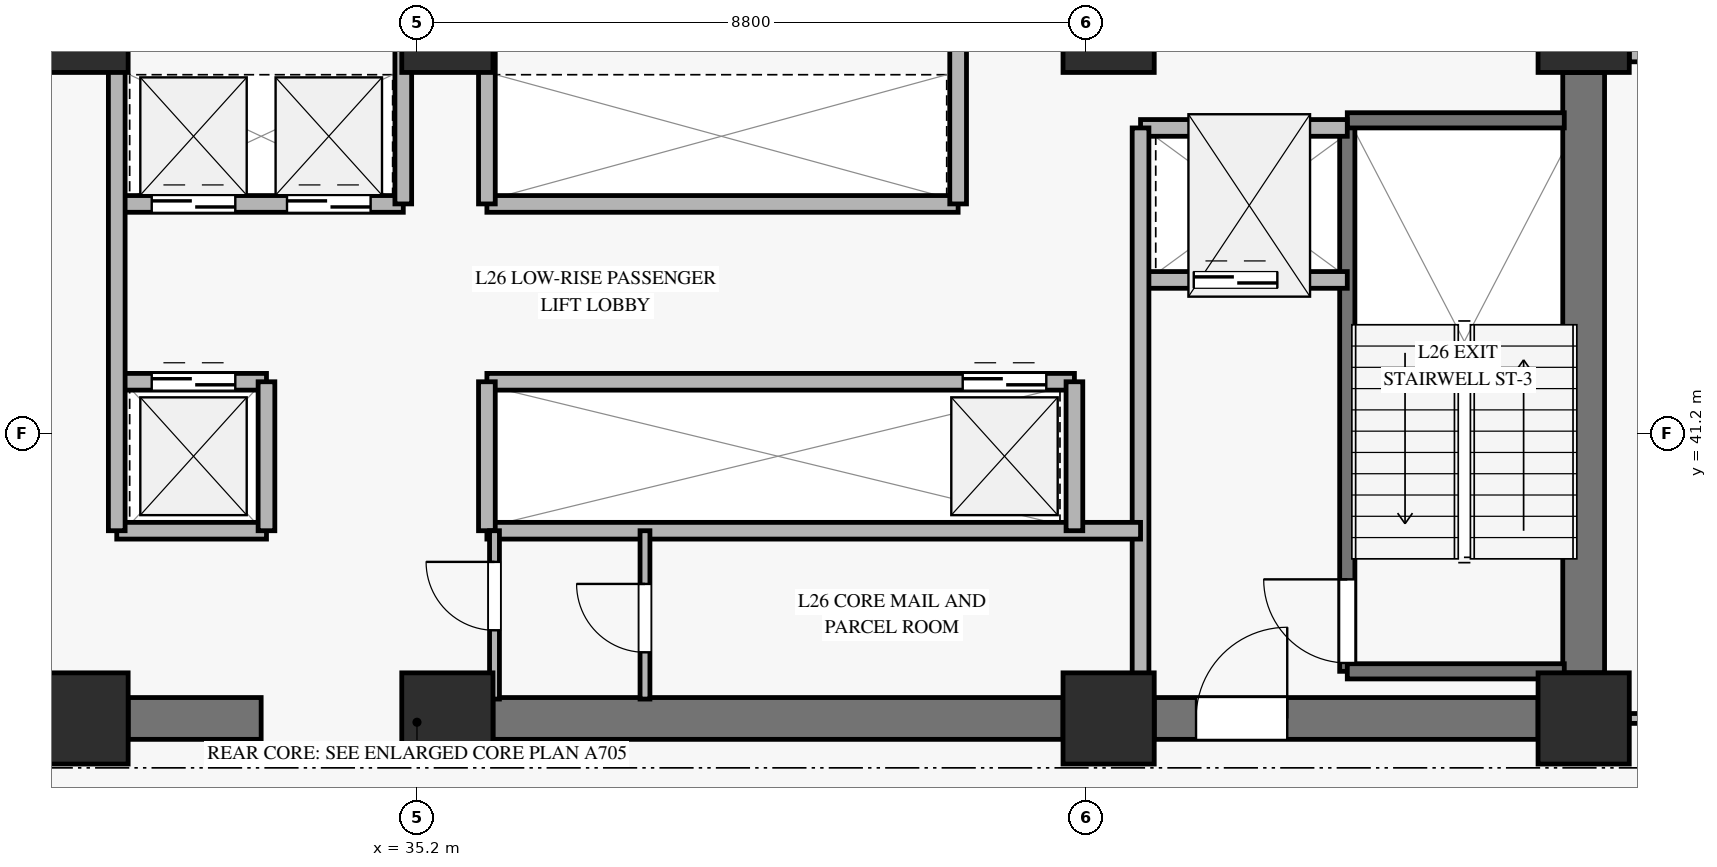
"""IFC4 building model, lengths in metres.
Left out: names, types, materials, properties, quantities, classifications, styles, units other than length and angle.
Written with IfcOpenShell. Run it as: python <this file> out.ifc"""

import sys

from ifc_helpers import new_model, si_unit, direction, frame, frame_2d, origin, origin_2d, place, context, subcontext, project, spatial, rectangle, extrude, source, transform, mapped, element, fill, save


model = new_model("IFC4")
c1 = context("Model", 3, precision=1e-05, world=origin(), true_north=direction((0.0, 1.0)))
c2 = subcontext(c1, "Body", "Model", "MODEL_VIEW")
j1 = project(units=[si_unit("LENGTHUNIT", "METRE"), si_unit("PLANEANGLEUNIT", "RADIAN")], contexts=[c1])
p1 = place(None, origin())
s1 = spatial("IfcSite", under=j1, at=p1, CompositionType="ELEMENT")
p2 = place(p1, origin())
s2 = spatial("IfcBuilding", under=s1, at=p2, CompositionType="ELEMENT")
p3 = place(p2, frame((0.0, 0.0, 107.5)))
s3 = spatial("IfcBuildingStorey", under=s2, at=p3, CompositionType="ELEMENT", Elevation=107.5)
m1 = source(origin(), c2, "Body", "SweptSolid", [
    extrude(rectangle(XDim=1.2, YDim=1.2, at=origin_2d()), origin(), (0.0, 0.0, 1.0), 3.68),
])
for number, where, z_axis, x_axis in (
    (1, (30.8, 37.45, 0.0), (0.0, 0.0, 1.0), (1.0, 0.0, 0.0)),
    (2, (30.8, 46.55, 0.0), (0.0, 0.0, 1.0), (1.0, 0.0, 0.0)),
    (3, (35.6, 37.45, 0.0), (0.0, 0.0, 1.0), (1.0, 0.0, 0.0)),
    (4, (35.6, 46.55, 0.0), (0.0, 0.0, 1.0), (1.0, 0.0, 0.0)),
    (5, (44.3, 37.45, 0.0), (0.0, 0.0, 1.0), (1.0, 0.0, 0.0)),
    (6, (44.3, 46.55, 0.0), (0.0, 0.0, 1.0), (1.0, 0.0, 0.0)),
    (7, (50.55, 37.45, 0.0), (0.0, 0.0, 1.0), (1.0, 0.0, 0.0)),
    (8, (50.55, 46.55, 0.0), (0.0, 0.0, 1.0), (1.0, 0.0, 0.0)),
):
    element("IfcColumn", number, at=place(p3, frame(where, z_axis=z_axis, x_axis=x_axis)), inside=s3, PredefinedType="PILASTER", context=c2, shape_type="MappedRepresentation", body=[
        mapped(m1, transform((0.0, 0.0, 0.0), x_axis=(1.0, 0.0, 0.0), y_axis=(0.0, 1.0, 0.0), z_axis=(0.0, 0.0, 1.0), scale=1.0)),
    ])
p4 = place(p3, frame((31.4, 37.45, 0.0), z_axis=(0.0, 0.0, 1.0), x_axis=(1.0, 0.0, 0.0)))
e9 = element("IfcWall", 9, at=p4, inside=s3, PredefinedType="SHEAR", context=c2, shape_type="SweptSolid", body=[
    extrude(rectangle(XDim=1.75, YDim=0.55, at=frame_2d((0.875, 0.0))), origin(), (0.0, 0.0, 1.0), 3.68),
])
p5 = place(p3, frame((36.2, 37.45, 0.0), z_axis=(0.0, 0.0, 1.0), x_axis=(1.0, 0.0, 0.0)))
e10 = element("IfcWall", 10, at=p5, inside=s3, PredefinedType="SHEAR", context=c2, shape_type="SweptSolid", body=[
    extrude(rectangle(XDim=7.5, YDim=0.55, at=frame_2d((3.75, 0.0))), origin(), (0.0, 0.0, 1.0), 3.68),
])
p6 = place(p3, frame((44.9, 37.45, 0.0), z_axis=(0.0, 0.0, 1.0), x_axis=(1.0, 0.0, 0.0)))
e11 = element("IfcWall", 11, at=p6, inside=s3, PredefinedType="SHEAR", context=c2, shape_type="SweptSolid", body=[
    extrude(rectangle(XDim=5.05, YDim=0.55, at=frame_2d((2.525, 0.0))), origin(), (0.0, 0.0, 1.0), 3.68),
])
p7 = place(p6, frame((0.55, 0.0, 0.0)))
e12 = element("IfcOpeningElement", 12, at=p7, cuts=e11, PredefinedType="OPENING", context=c2, shape_type="SweptSolid", body=[
    extrude(rectangle(XDim=1.2, YDim=2.15, at=frame_2d((0.6, 1.075))), frame((0.0, 0.285, 0.0), z_axis=(0.0, -1.0, 0.0), x_axis=(1.0, 0.0, 0.0)), (0.0, 0.0, 1.0), 0.57),
])
p8 = place(p3, frame((50.55, 38.05, 0.0), z_axis=(0.0, 0.0, 1.0), x_axis=(0.0, 1.0, 0.0)))
e13 = element("IfcWall", 13, at=p8, inside=s3, PredefinedType="SHEAR", context=c2, shape_type="SweptSolid", body=[
    extrude(rectangle(XDim=7.9, YDim=0.55, at=frame_2d((3.95, 0.0))), origin(), (0.0, 0.0, 1.0), 3.68),
])
p9 = place(p3, frame((51.15, 46.25, 0.0), z_axis=(0.0, 0.0, 1.0), x_axis=(1.0, 0.0, 0.0)))
e14 = element("IfcWall", 14, at=p9, inside=s3, PredefinedType="SOLIDWALL", context=c2, shape_type="SweptSolid", body=[
    extrude(rectangle(XDim=11.248, YDim=0.32, at=frame_2d((5.624, 0.0))), origin(), (0.0, 0.0, 1.0), 3.16),
])
p10 = place(p9, frame((4.824, 0.0, 0.45)))
e15 = element("IfcOpeningElement", 15, at=p10, cuts=e14, PredefinedType="OPENING", context=c2, shape_type="SweptSolid", body=[
    extrude(rectangle(XDim=1.6, YDim=2.0, at=frame_2d((0.8, 1.0))), frame((0.0, 0.17, 0.0), z_axis=(0.0, -1.0, 0.0), x_axis=(1.0, 0.0, 0.0)), (0.0, 0.0, 1.0), 0.34),
])
p11 = place(p3, frame((47.44, 38.07, 0.0), z_axis=(0.0, 0.0, 1.0), x_axis=(0.0, 1.0, 0.0)))
e16 = element("IfcWall", 16, at=p11, inside=s3, PredefinedType="SOLIDWALL", context=c2, shape_type="SweptSolid", body=[
    extrude(rectangle(XDim=7.25, YDim=0.2, at=frame_2d((3.625, 0.0))), origin(), (0.0, 0.0, 1.0), 3.9),
])
p12 = place(p11, frame((0.11, 0.0, 0.0)))
e17 = element("IfcOpeningElement", 17, at=p12, cuts=e16, PredefinedType="OPENING", context=c2, shape_type="SweptSolid", body=[
    extrude(rectangle(XDim=1.1, YDim=2.15, at=frame_2d((0.55, 1.075))), frame((0.0, 0.11, 0.0), z_axis=(0.0, -1.0, 0.0), x_axis=(1.0, 0.0, 0.0)), (0.0, 0.0, 1.0), 0.22),
])
for number, where, z_axis, x_axis in (
    (18, (47.44, 45.32, 0.0), (0.0, 0.0, 1.0), (1.0, 0.0, 0.0)),
    (19, (47.44, 38.07, 0.0), (0.0, 0.0, 1.0), (1.0, 0.0, 0.0)),
):
    element("IfcWall", number, at=place(p3, frame(where, z_axis=z_axis, x_axis=x_axis)), inside=s3, PredefinedType="SOLIDWALL", context=c2, shape_type="SweptSolid", body=[
        extrude(rectangle(XDim=2.855, YDim=0.2, at=frame_2d((1.427, 0.0))), origin(), (0.0, 0.0, 1.0), 3.9),
    ])
p13 = place(p3, frame((44.72, 43.22, 0.0), z_axis=(0.0, 0.0, 1.0), x_axis=(1.0, 0.0, 0.0)))
e20 = element("IfcWall", 20, at=p13, inside=s3, PredefinedType="SOLIDWALL", context=c2, shape_type="SweptSolid", body=[
    extrude(rectangle(XDim=2.72, YDim=0.22, at=frame_2d((1.36, 0.0))), origin(), (0.0, 0.0, 1.0), 3.68),
])
p14 = place(p13, frame((0.7, 0.0, 0.0)))
e21 = element("IfcOpeningElement", 21, at=p14, cuts=e20, PredefinedType="OPENING", context=c2, shape_type="SweptSolid", body=[
    extrude(rectangle(XDim=1.1, YDim=2.2, at=frame_2d((0.55, 1.1))), frame((0.0, 0.12, 0.0), z_axis=(0.0, -1.0, 0.0), x_axis=(1.0, 0.0, 0.0)), (0.0, 0.0, 1.0), 0.24),
])
p15 = place(p3, frame((44.72, 45.22, 0.0), z_axis=(0.0, 0.0, 1.0), x_axis=(1.0, 0.0, 0.0)))
e22 = element("IfcWall", 22, at=p15, inside=s3, PredefinedType="SOLIDWALL", context=c2, shape_type="SweptSolid", body=[
    extrude(rectangle(XDim=2.72, YDim=0.22, at=frame_2d((1.36, 0.0))), origin(), (0.0, 0.0, 1.0), 3.68),
])
p16 = place(p3, frame((44.72, 37.705, 0.0), z_axis=(0.0, 0.0, 1.0), x_axis=(0.0, 1.0, 0.0)))
e23 = element("IfcWall", 23, at=p16, inside=s3, PredefinedType="SOLIDWALL", context=c2, shape_type="SweptSolid", body=[
    extrude(rectangle(XDim=7.515, YDim=0.22, at=frame_2d((3.757, 0.0))), origin(), (0.0, 0.0, 1.0), 3.68),
])
p17 = place(p3, frame((31.25, 44.22, 0.0), z_axis=(0.0, 0.0, 1.0), x_axis=(1.0, 0.0, 0.0)))
e24 = element("IfcWall", 24, at=p17, inside=s3, PredefinedType="SOLIDWALL", context=c2, shape_type="SweptSolid", body=[
    extrude(rectangle(XDim=3.77, YDim=0.22, at=frame_2d((1.885, 0.0))), origin(), (0.0, 0.0, 1.0), 3.68),
])
p18 = place(p17, frame((0.46, 0.0, 0.0)))
e25 = element("IfcOpeningElement", 25, at=p18, cuts=e24, PredefinedType="OPENING", context=c2, shape_type="SweptSolid", body=[
    extrude(rectangle(XDim=1.1, YDim=2.2, at=frame_2d((0.55, 1.1))), frame((0.0, 0.12, 0.0), z_axis=(0.0, -1.0, 0.0), x_axis=(1.0, 0.0, 0.0)), (0.0, 0.0, 1.0), 0.24),
])
p19 = place(p17, frame((2.24, 0.0, 0.0)))
e26 = element("IfcOpeningElement", 26, at=p19, cuts=e24, PredefinedType="OPENING", context=c2, shape_type="SweptSolid", body=[
    extrude(rectangle(XDim=1.1, YDim=2.2, at=frame_2d((0.55, 1.1))), frame((0.0, 0.12, 0.0), z_axis=(0.0, -1.0, 0.0), x_axis=(1.0, 0.0, 0.0)), (0.0, 0.0, 1.0), 0.24),
])
p20 = place(p3, frame((36.12, 44.22, 0.0), z_axis=(0.0, 0.0, 1.0), x_axis=(1.0, 0.0, 0.0)))
e27 = element("IfcWall", 27, at=p20, inside=s3, PredefinedType="SOLIDWALL", context=c2, shape_type="SweptSolid", body=[
    extrude(rectangle(XDim=6.2, YDim=0.22, at=frame_2d((3.1, 0.0))), origin(), (0.0, 0.0, 1.0), 3.68),
])
for number, where, z_axis, x_axis in (
    (28, (35.02, 44.22, 0.0), (0.0, 0.0, 1.0), (0.0, 1.0, 0.0)),
    (29, (36.12, 44.22, 0.0), (0.0, 0.0, 1.0), (0.0, 1.0, 0.0)),
    (30, (42.32, 44.22, 0.0), (0.0, 0.0, 1.0), (0.0, 1.0, 0.0)),
):
    element("IfcWall", number, at=place(p3, frame(where, z_axis=z_axis, x_axis=x_axis)), inside=s3, PredefinedType="SOLIDWALL", context=c2, shape_type="SweptSolid", body=[
        extrude(rectangle(XDim=2.075, YDim=0.22, at=frame_2d((1.038, 0.0))), origin(), (0.0, 0.0, 1.0), 3.68),
    ])
p21 = place(p3, frame((31.25, 41.88, 0.0), z_axis=(0.0, 0.0, 1.0), x_axis=(1.0, 0.0, 0.0)))
e31 = element("IfcWall", 31, at=p21, inside=s3, PredefinedType="SOLIDWALL", context=c2, shape_type="SweptSolid", body=[
    extrude(rectangle(XDim=1.97, YDim=0.22, at=frame_2d((0.985, 0.0))), origin(), (0.0, 0.0, 1.0), 3.68),
])
p22 = place(p21, frame((0.46, 0.0, 0.0)))
e32 = element("IfcOpeningElement", 32, at=p22, cuts=e31, PredefinedType="OPENING", context=c2, shape_type="SweptSolid", body=[
    extrude(rectangle(XDim=1.1, YDim=2.2, at=frame_2d((0.55, 1.1))), frame((0.0, 0.12, 0.0), z_axis=(0.0, -1.0, 0.0), x_axis=(1.0, 0.0, 0.0)), (0.0, 0.0, 1.0), 0.24),
])
p23 = place(p3, frame((36.12, 41.88, 0.0), z_axis=(0.0, 0.0, 1.0), x_axis=(1.0, 0.0, 0.0)))
e33 = element("IfcWall", 33, at=p23, inside=s3, PredefinedType="SOLIDWALL", context=c2, shape_type="SweptSolid", body=[
    extrude(rectangle(XDim=7.73, YDim=0.22, at=frame_2d((3.865, 0.0))), origin(), (0.0, 0.0, 1.0), 3.68),
])
p24 = place(p23, frame((6.26, 0.0, 0.0)))
e34 = element("IfcOpeningElement", 34, at=p24, cuts=e33, PredefinedType="OPENING", context=c2, shape_type="SweptSolid", body=[
    extrude(rectangle(XDim=1.1, YDim=2.2, at=frame_2d((0.55, 1.1))), frame((0.0, 0.12, 0.0), z_axis=(0.0, -1.0, 0.0), x_axis=(1.0, 0.0, 0.0)), (0.0, 0.0, 1.0), 0.24),
])
p25 = place(p3, frame((31.25, 39.92, 0.0), z_axis=(0.0, 0.0, 1.0), x_axis=(1.0, 0.0, 0.0)))
e35 = element("IfcWall", 35, at=p25, inside=s3, PredefinedType="SOLIDWALL", context=c2, shape_type="SweptSolid", body=[
    extrude(rectangle(XDim=1.97, YDim=0.22, at=frame_2d((0.985, 0.0))), origin(), (0.0, 0.0, 1.0), 3.68),
])
p26 = place(p3, frame((33.22, 39.92, 0.0), z_axis=(0.0, 0.0, 1.0), x_axis=(0.0, 1.0, 0.0)))
e36 = element("IfcWall", 36, at=p26, inside=s3, PredefinedType="SOLIDWALL", context=c2, shape_type="SweptSolid", body=[
    extrude(rectangle(XDim=1.96, YDim=0.22, at=frame_2d((0.98, 0.0))), origin(), (0.0, 0.0, 1.0), 3.68),
])
p27 = place(p3, frame((36.12, 39.92, 0.0), z_axis=(0.0, 0.0, 1.0), x_axis=(1.0, 0.0, 0.0)))
e37 = element("IfcWall", 37, at=p27, inside=s3, PredefinedType="SOLIDWALL", context=c2, shape_type="SweptSolid", body=[
    extrude(rectangle(XDim=8.6, YDim=0.22, at=frame_2d((4.3, 0.0))), origin(), (0.0, 0.0, 1.0), 2.965),
])
p28 = place(p3, frame((36.12, 39.92, 0.0), z_axis=(0.0, 0.0, 1.0), x_axis=(0.0, 1.0, 0.0)))
e38 = element("IfcWall", 38, at=p28, inside=s3, PredefinedType="SOLIDWALL", context=c2, shape_type="SweptSolid", body=[
    extrude(rectangle(XDim=1.96, YDim=0.22, at=frame_2d((0.98, 0.0))), origin(), (0.0, 0.0, 1.0), 3.68),
])
p29 = place(p3, frame((31.25, 39.92, 0.0), z_axis=(0.0, 0.0, 1.0), x_axis=(0.0, 1.0, 0.0)))
e39 = element("IfcWall", 39, at=p29, inside=s3, PredefinedType="SOLIDWALL", context=c2, shape_type="SweptSolid", body=[
    extrude(rectangle(XDim=6.375, YDim=0.22, at=frame_2d((3.188, 0.0))), origin(), (0.0, 0.0, 1.0), 3.68),
])
p30 = place(p3, frame((43.85, 39.92, 0.0), z_axis=(0.0, 0.0, 1.0), x_axis=(0.0, 1.0, 0.0)))
e40 = element("IfcWall", 40, at=p30, inside=s3, PredefinedType="SOLIDWALL", context=c2, shape_type="SweptSolid", body=[
    extrude(rectangle(XDim=1.96, YDim=0.22, at=frame_2d((0.98, 0.0))), origin(), (0.0, 0.0, 1.0), 3.68),
])
p31 = place(p3, frame((36.22, 37.705, 0.0), z_axis=(0.0, 0.0, 1.0), x_axis=(0.0, 1.0, 0.0)))
e41 = element("IfcWall", 41, at=p31, inside=s3, PredefinedType="PARTITIONING", context=c2, shape_type="SweptSolid", body=[
    extrude(rectangle(XDim=2.215, YDim=0.13, at=frame_2d((1.107, 0.0))), origin(), (0.0, 0.0, 1.0), 3.68),
])
p32 = place(p31, frame((0.905, 0.0, 0.0)))
e42 = element("IfcOpeningElement", 42, at=p32, cuts=e41, PredefinedType="OPENING", context=c2, shape_type="SweptSolid", body=[
    extrude(rectangle(XDim=0.9, YDim=2.1, at=frame_2d((0.45, 1.05))), frame((0.0, 0.075, 0.0), z_axis=(0.0, -1.0, 0.0), x_axis=(1.0, 0.0, 0.0)), (0.0, 0.0, 1.0), 0.15),
])
p33 = place(p3, frame((38.2, 37.705, 0.0), z_axis=(0.0, 0.0, 1.0), x_axis=(0.0, 1.0, 0.0)))
e43 = element("IfcWall", 43, at=p33, inside=s3, PredefinedType="PARTITIONING", context=c2, shape_type="SweptSolid", body=[
    extrude(rectangle(XDim=2.215, YDim=0.13, at=frame_2d((1.107, 0.0))), origin(), (0.0, 0.0, 1.0), 3.68),
])
p34 = place(p33, frame((0.615, 0.0, 0.0)))
e44 = element("IfcOpeningElement", 44, at=p34, cuts=e43, PredefinedType="OPENING", context=c2, shape_type="SweptSolid", body=[
    extrude(rectangle(XDim=0.9, YDim=2.1, at=frame_2d((0.45, 1.05))), frame((0.0, 0.075, 0.0), z_axis=(0.0, -1.0, 0.0), x_axis=(1.0, 0.0, 0.0)), (0.0, 0.0, 1.0), 0.15),
])
p35 = place(p3, frame((51.15, 37.45, 0.0), z_axis=(0.0, 0.0, 1.0), x_axis=(1.0, 0.0, 0.0)))
e45 = element("IfcWall", 45, at=p35, inside=s3, PredefinedType="PARTITIONING", context=c2, shape_type="SweptSolid", body=[
    extrude(rectangle(XDim=14.741, YDim=0.13, at=frame_2d((7.371, 0.0))), origin(), (0.0, 0.0, 1.0), 3.165),
])
p36 = place(p35, frame((0.5, 0.0, 0.0)))
e46 = element("IfcOpeningElement", 46, at=p36, cuts=e45, PredefinedType="OPENING", context=c2, shape_type="SweptSolid", body=[
    extrude(rectangle(XDim=0.9, YDim=2.1, at=frame_2d((0.45, 1.05))), frame((0.0, 0.075, 0.0), z_axis=(0.0, -1.0, 0.0), x_axis=(1.0, 0.0, 0.0)), (0.0, 0.0, 1.0), 0.15),
])
p37 = place(p35, frame((10.594, 0.0, 0.0)))
e47 = element("IfcOpeningElement", 47, at=p37, cuts=e45, PredefinedType="OPENING", context=c2, shape_type="SweptSolid", body=[
    extrude(rectangle(XDim=0.95, YDim=2.1, at=frame_2d((0.475, 1.05))), frame((0.0, 0.075, 0.0), z_axis=(0.0, -1.0, 0.0), x_axis=(1.0, 0.0, 0.0)), (0.0, 0.0, 1.0), 0.15),
])
m2 = source(origin(), c2, "Body", "SweptSolid", [
    extrude(rectangle(XDim=1.1, YDim=2.15, at=frame_2d((0.55, 1.075))), frame((0.0, 0.025, 0.0), z_axis=(0.0, -1.0, 0.0), x_axis=(1.0, 0.0, 0.0)), (0.0, 0.0, 1.0), 0.05),
])
p38 = place(p12, origin())
e48 = element("IfcDoor", 48, at=p38, inside=s3, OperationType="SINGLE_SWING_RIGHT", PredefinedType="DOOR", context=c2, shape_type="MappedRepresentation", body=[
    mapped(m2, transform((0.0, 0.0, 0.0), x_axis=(1.0, 0.0, 0.0), y_axis=(0.0, 1.0, 0.0), z_axis=(0.0, 0.0, 1.0), scale=1.0)),
])
fill(e17, e48)
m3 = source(origin(), c2, "Body", "SweptSolid", [
    extrude(rectangle(XDim=1.1, YDim=2.2, at=frame_2d((0.55, 1.1))), frame((0.0, 0.025, 0.0), z_axis=(0.0, -1.0, 0.0), x_axis=(1.0, 0.0, 0.0)), (0.0, 0.0, 1.0), 0.05),
])
p39 = place(p14, origin())
e49 = element("IfcDoor", 49, at=p39, inside=s3, OperationType="SLIDING_TO_LEFT", PredefinedType="DOOR", context=c2, shape_type="MappedRepresentation", body=[
    mapped(m3, transform((0.0, 0.0, 0.0), x_axis=(1.0, 0.0, 0.0), y_axis=(0.0, 1.0, 0.0), z_axis=(0.0, 0.0, 1.0), scale=1.0)),
])
fill(e21, e49)
m4 = source(origin(), c2, "Body", "SweptSolid", [
    extrude(rectangle(XDim=1.2, YDim=2.15, at=frame_2d((0.6, 1.075))), frame((0.0, 0.025, 0.0), z_axis=(0.0, -1.0, 0.0), x_axis=(1.0, 0.0, 0.0)), (0.0, 0.0, 1.0), 0.05),
])
p40 = place(p7, origin())
e50 = element("IfcDoor", 50, at=p40, inside=s3, OperationType="SINGLE_SWING_RIGHT", PredefinedType="DOOR", context=c2, shape_type="MappedRepresentation", body=[
    mapped(m4, transform((0.0, 0.0, 0.0), x_axis=(1.0, 0.0, 0.0), y_axis=(0.0, 1.0, 0.0), z_axis=(0.0, 0.0, 1.0), scale=1.0)),
])
fill(e12, e50)
p41 = place(p18, origin())
e51 = element("IfcDoor", 51, at=p41, inside=s3, OperationType="SLIDING_TO_LEFT", PredefinedType="DOOR", context=c2, shape_type="MappedRepresentation", body=[
    mapped(m3, transform((0.0, 0.0, 0.0), x_axis=(1.0, 0.0, 0.0), y_axis=(0.0, 1.0, 0.0), z_axis=(0.0, 0.0, 1.0), scale=1.0)),
])
fill(e25, e51)
p42 = place(p19, origin())
e52 = element("IfcDoor", 52, at=p42, inside=s3, OperationType="SLIDING_TO_LEFT", PredefinedType="DOOR", context=c2, shape_type="MappedRepresentation", body=[
    mapped(m3, transform((0.0, 0.0, 0.0), x_axis=(1.0, 0.0, 0.0), y_axis=(0.0, 1.0, 0.0), z_axis=(0.0, 0.0, 1.0), scale=1.0)),
])
fill(e26, e52)
p43 = place(p22, origin())
e53 = element("IfcDoor", 53, at=p43, inside=s3, OperationType="SLIDING_TO_LEFT", PredefinedType="DOOR", context=c2, shape_type="MappedRepresentation", body=[
    mapped(m3, transform((0.0, 0.0, 0.0), x_axis=(1.0, 0.0, 0.0), y_axis=(0.0, 1.0, 0.0), z_axis=(0.0, 0.0, 1.0), scale=1.0)),
])
fill(e32, e53)
p44 = place(p24, origin())
e54 = element("IfcDoor", 54, at=p44, inside=s3, OperationType="SLIDING_TO_LEFT", PredefinedType="DOOR", context=c2, shape_type="MappedRepresentation", body=[
    mapped(m3, transform((0.0, 0.0, 0.0), x_axis=(1.0, 0.0, 0.0), y_axis=(0.0, 1.0, 0.0), z_axis=(0.0, 0.0, 1.0), scale=1.0)),
])
fill(e34, e54)
m5 = source(origin(), c2, "Body", "SweptSolid", [
    extrude(rectangle(XDim=0.9, YDim=2.1, at=frame_2d((0.45, 1.05))), frame((0.0, 0.025, 0.0), z_axis=(0.0, -1.0, 0.0), x_axis=(1.0, 0.0, 0.0)), (0.0, 0.0, 1.0), 0.05),
])
p45 = place(p32, origin())
e55 = element("IfcDoor", 55, at=p45, inside=s3, OperationType="SINGLE_SWING_RIGHT", PredefinedType="DOOR", context=c2, shape_type="MappedRepresentation", body=[
    mapped(m5, transform((0.0, 0.0, 0.0), x_axis=(1.0, 0.0, 0.0), y_axis=(0.0, 1.0, 0.0), z_axis=(0.0, 0.0, 1.0), scale=1.0)),
])
fill(e42, e55)
p46 = place(p34, origin())
e56 = element("IfcDoor", 56, at=p46, inside=s3, OperationType="SINGLE_SWING_RIGHT", PredefinedType="DOOR", context=c2, shape_type="MappedRepresentation", body=[
    mapped(m5, transform((0.0, 0.0, 0.0), x_axis=(1.0, 0.0, 0.0), y_axis=(0.0, 1.0, 0.0), z_axis=(0.0, 0.0, 1.0), scale=1.0)),
])
fill(e44, e56)
save(model, sys.argv[1])
